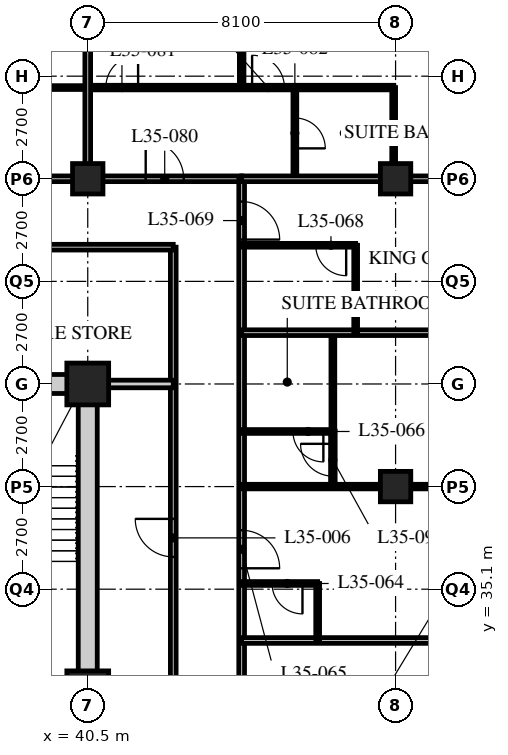
"""IFC4 building model, lengths in metres.
Left out: names, types, materials, properties, quantities, classifications, styles, units other than length and angle.
Written with IfcOpenShell. Run it as: python <this file> out.ifc"""

import sys

from ifc_helpers import new_model, si_unit, direction, frame, frame_2d, origin, origin_2d, place, context, subcontext, project, spatial, rectangle, hollow_rectangle, extrude, element, fill, save


model = new_model("IFC4")
c1 = context("Model", 3, precision=1e-05, world=origin(), true_north=direction((0.0, 1.0)))
c2 = subcontext(c1, "Body", "Model", "MODEL_VIEW")
j1 = project(units=[si_unit("LENGTHUNIT", "METRE"), si_unit("PLANEANGLEUNIT", "RADIAN")], contexts=[c1])
p1 = place(None, origin())
s1 = spatial("IfcSite", under=j1, at=p1, CompositionType="ELEMENT")
p2 = place(p1, origin())
s2 = spatial("IfcBuilding", under=s1, at=p2, CompositionType="ELEMENT")
p3 = place(p2, frame((0.0, 0.0, 137.4)))
s3 = spatial("IfcBuildingStorey", under=s2, at=p3, CompositionType="ELEMENT", Elevation=137.4)
for number, where, z_axis, x_axis in (
    (1, (40.5, 32.4, 0.0), (0.0, 0.0, 1.0), (1.0, 0.0, 0.0)),
    (2, (40.5, 40.5, 0.0), (0.0, 0.0, 1.0), (1.0, 0.0, 0.0)),
):
    element("IfcColumn", number, at=place(p3, frame(where, z_axis=z_axis, x_axis=x_axis)), inside=s3, PredefinedType="COLUMN", context=c2, shape_type="SweptSolid", body=[
        extrude(hollow_rectangle(XDim=1.1, YDim=1.1, WallThickness=0.1, at=origin_2d()), origin(), (0.0, 0.0, 1.0), 3.4),
    ])
for number, where, z_axis, x_axis in (
    (3, (40.5, 45.9, 0.0), (0.0, 0.0, 1.0), (1.0, 0.0, 0.0)),
    (4, (48.6, 37.8, 0.0), (0.0, 0.0, 1.0), (1.0, 0.0, 0.0)),
    (5, (48.6, 45.9, 0.0), (0.0, 0.0, 1.0), (1.0, 0.0, 0.0)),
):
    element("IfcColumn", number, at=place(p3, frame(where, z_axis=z_axis, x_axis=x_axis)), inside=s3, PredefinedType="COLUMN", context=c2, shape_type="SweptSolid", body=[
        extrude(hollow_rectangle(XDim=0.8, YDim=0.8, WallThickness=0.08, at=origin_2d()), origin(), (0.0, 0.0, 1.0), 3.4),
    ])
p4 = place(p3, frame((8.1, 45.9, 0.0), z_axis=(0.0, 0.0, 1.0), x_axis=(1.0, 0.0, 0.0)))
e6 = element("IfcWall", 6, at=p4, inside=s3, PredefinedType="PARTITIONING", context=c2, shape_type="SweptSolid", body=[
    extrude(rectangle(XDim=36.45, YDim=0.15, at=frame_2d((18.225, 0.0))), origin(), (0.0, 0.0, 1.0), 2.578),
])
p5 = place(p4, frame((9.625, 0.0, 0.0)))
e7 = element("IfcOpeningElement", 7, at=p5, cuts=e6, PredefinedType="OPENING", context=c2, shape_type="SweptSolid", body=[
    extrude(rectangle(XDim=1.0, YDim=2.1, at=frame_2d((0.5, 1.05))), frame((0.0, 0.085, 0.0), z_axis=(0.0, -1.0, 0.0), x_axis=(1.0, 0.0, 0.0)), (0.0, 0.0, 1.0), 0.17),
])
p6 = place(p4, frame((21.775, 0.0, 0.0)))
e8 = element("IfcOpeningElement", 8, at=p6, cuts=e6, PredefinedType="OPENING", context=c2, shape_type="SweptSolid", body=[
    extrude(rectangle(XDim=1.0, YDim=2.1, at=frame_2d((0.5, 1.05))), frame((0.0, 0.085, 0.0), z_axis=(0.0, -1.0, 0.0), x_axis=(1.0, 0.0, 0.0)), (0.0, 0.0, 1.0), 0.17),
])
p7 = place(p4, frame((28.95, 0.0, 0.0)))
e9 = element("IfcOpeningElement", 9, at=p7, cuts=e6, PredefinedType="OPENING", context=c2, shape_type="SweptSolid", body=[
    extrude(rectangle(XDim=1.0, YDim=2.1, at=frame_2d((0.5, 1.05))), frame((0.0, 0.085, 0.0), z_axis=(0.0, -1.0, 0.0), x_axis=(1.0, 0.0, 0.0)), (0.0, 0.0, 1.0), 0.17),
])
p8 = place(p4, frame((33.925, 0.0, 0.0)))
e10 = element("IfcOpeningElement", 10, at=p8, cuts=e6, PredefinedType="OPENING", context=c2, shape_type="SweptSolid", body=[
    extrude(rectangle(XDim=1.0, YDim=2.1, at=frame_2d((0.5, 1.05))), frame((0.0, 0.085, 0.0), z_axis=(0.0, -1.0, 0.0), x_axis=(1.0, 0.0, 0.0)), (0.0, 0.0, 1.0), 0.17),
])
p9 = place(p4, frame((2.625, 0.0, 0.0)))
e11 = element("IfcOpeningElement", 11, at=p9, cuts=e6, PredefinedType="OPENING", context=c2, shape_type="SweptSolid", body=[
    extrude(rectangle(XDim=1.0, YDim=2.1, at=frame_2d((0.5, 1.05))), frame((0.0, 0.085, 0.0), z_axis=(0.0, -1.0, 0.0), x_axis=(1.0, 0.0, 0.0)), (0.0, 0.0, 1.0), 0.17),
])
p10 = place(p3, frame((44.55, 17.55, 0.0), z_axis=(0.0, 0.0, 1.0), x_axis=(0.0, 1.0, 0.0)))
e12 = element("IfcWall", 12, at=p10, inside=s3, PredefinedType="PARTITIONING", context=c2, shape_type="SweptSolid", body=[
    extrude(rectangle(XDim=28.35, YDim=0.15, at=frame_2d((14.175, 0.0))), origin(), (0.0, 0.0, 1.0), 3.19),
])
p11 = place(p10, frame((2.75, 0.0, 0.0)))
e13 = element("IfcOpeningElement", 13, at=p11, cuts=e12, PredefinedType="OPENING", context=c2, shape_type="SweptSolid", body=[
    extrude(rectangle(XDim=1.0, YDim=2.1, at=frame_2d((0.5, 1.05))), frame((0.0, 0.085, 0.0), z_axis=(0.0, -1.0, 0.0), x_axis=(1.0, 0.0, 0.0)), (0.0, 0.0, 1.0), 0.17),
])
p12 = place(p10, frame((6.5, 0.0, 0.0)))
e14 = element("IfcOpeningElement", 14, at=p12, cuts=e12, PredefinedType="OPENING", context=c2, shape_type="SweptSolid", body=[
    extrude(rectangle(XDim=1.0, YDim=2.1, at=frame_2d((0.5, 1.05))), frame((0.0, 0.085, 0.0), z_axis=(0.0, -1.0, 0.0), x_axis=(1.0, 0.0, 0.0)), (0.0, 0.0, 1.0), 0.17),
])
p13 = place(p10, frame((13.55, 0.0, 0.0)))
e15 = element("IfcOpeningElement", 15, at=p13, cuts=e12, PredefinedType="OPENING", context=c2, shape_type="SweptSolid", body=[
    extrude(rectangle(XDim=1.0, YDim=2.1, at=frame_2d((0.5, 1.05))), frame((0.0, 0.085, 0.0), z_axis=(0.0, -1.0, 0.0), x_axis=(1.0, 0.0, 0.0)), (0.0, 0.0, 1.0), 0.17),
])
p14 = place(p10, frame((18.1, 0.0, 0.0)))
e16 = element("IfcOpeningElement", 16, at=p14, cuts=e12, PredefinedType="OPENING", context=c2, shape_type="SweptSolid", body=[
    extrude(rectangle(XDim=1.0, YDim=2.1, at=frame_2d((0.5, 1.05))), frame((0.0, 0.085, 0.0), z_axis=(0.0, -1.0, 0.0), x_axis=(1.0, 0.0, 0.0)), (0.0, 0.0, 1.0), 0.17),
])
p15 = place(p10, frame((26.75, 0.0, 0.0)))
e17 = element("IfcOpeningElement", 17, at=p15, cuts=e12, PredefinedType="OPENING", context=c2, shape_type="SweptSolid", body=[
    extrude(rectangle(XDim=1.0, YDim=2.1, at=frame_2d((0.5, 1.05))), frame((0.0, 0.085, 0.0), z_axis=(0.0, -1.0, 0.0), x_axis=(1.0, 0.0, 0.0)), (0.0, 0.0, 1.0), 0.17),
])
p16 = place(p3, frame((42.75, 19.35, 0.0), z_axis=(0.0, 0.0, 1.0), x_axis=(0.0, 1.0, 0.0)))
e18 = element("IfcWall", 18, at=p16, inside=s3, PredefinedType="PARTITIONING", context=c2, shape_type="SweptSolid", body=[
    extrude(rectangle(XDim=24.75, YDim=0.15, at=frame_2d((12.375, 0.0))), origin(), (0.0, 0.0, 1.0), 3.19),
])
p17 = place(p16, frame((8.5, 0.0, 0.0)))
e19 = element("IfcOpeningElement", 19, at=p17, cuts=e18, PredefinedType="OPENING", context=c2, shape_type="SweptSolid", body=[
    extrude(rectangle(XDim=1.0, YDim=2.1, at=frame_2d((0.5, 1.05))), frame((0.0, 0.085, 0.0), z_axis=(0.0, -1.0, 0.0), x_axis=(1.0, 0.0, 0.0)), (0.0, 0.0, 1.0), 0.17),
])
p18 = place(p16, frame((16.6, 0.0, 0.0)))
e20 = element("IfcOpeningElement", 20, at=p18, cuts=e18, PredefinedType="OPENING", context=c2, shape_type="SweptSolid", body=[
    extrude(rectangle(XDim=1.0, YDim=2.1, at=frame_2d((0.5, 1.05))), frame((0.0, 0.085, 0.0), z_axis=(0.0, -1.0, 0.0), x_axis=(1.0, 0.0, 0.0)), (0.0, 0.0, 1.0), 0.17),
])
p19 = place(p3, frame((42.75, 44.1, 0.0), z_axis=(0.0, 0.0, 1.0), x_axis=(-1.0, 0.0, 0.0)))
e21 = element("IfcWall", 21, at=p19, inside=s3, PredefinedType="PARTITIONING", context=c2, shape_type="SweptSolid", body=[
    extrude(rectangle(XDim=13.19, YDim=0.15, at=frame_2d((6.595, 0.0))), origin(), (0.0, 0.0, 1.0), 3.19),
])
p20 = place(p19, frame((10.2, 0.0, 0.0)))
e22 = element("IfcOpeningElement", 22, at=p20, cuts=e21, PredefinedType="OPENING", context=c2, shape_type="SweptSolid", body=[
    extrude(rectangle(XDim=1.0, YDim=2.1, at=frame_2d((0.5, 1.05))), frame((0.0, 0.085, 0.0), z_axis=(0.0, -1.0, 0.0), x_axis=(1.0, 0.0, 0.0)), (0.0, 0.0, 1.0), 0.17),
])
p21 = place(p19, frame((3.6, 0.0, 0.0)))
e23 = element("IfcOpeningElement", 23, at=p21, cuts=e21, PredefinedType="OPENING", context=c2, shape_type="SweptSolid", body=[
    extrude(rectangle(XDim=1.0, YDim=2.1, at=frame_2d((0.5, 1.05))), frame((0.0, 0.085, 0.0), z_axis=(0.0, -1.0, 0.0), x_axis=(1.0, 0.0, 0.0)), (0.0, 0.0, 1.0), 0.17),
])
p22 = place(p3, frame((40.5, 40.5, 0.0), z_axis=(0.0, 0.0, 1.0), x_axis=(1.0, 0.0, 0.0)))
e24 = element("IfcWall", 24, at=p22, inside=s3, PredefinedType="SOLIDWALL", context=c2, shape_type="SweptSolid", body=[
    extrude(rectangle(XDim=2.25, YDim=0.2, at=frame_2d((1.125, 0.0))), origin(), (0.0, 0.0, 1.0), 3.19),
])
p23 = place(p3, frame((38.2, 48.3, 0.0), z_axis=(0.0, 0.0, 1.0), x_axis=(1.0, 0.0, 0.0)))
e25 = element("IfcWall", 25, at=p23, inside=s3, PredefinedType="PARTITIONING", context=c2, shape_type="SweptSolid", body=[
    extrude(rectangle(XDim=2.3, YDim=0.1, at=frame_2d((1.15, 0.0))), origin(), (0.0, 0.0, 1.0), 3.19),
])
p24 = place(p3, frame((44.55, 33.75, 0.0), z_axis=(0.0, 0.0, 1.0), x_axis=(1.0, 0.0, 0.0)))
e26 = element("IfcWall", 26, at=p24, inside=s3, PredefinedType="PARTITIONING", context=c2, shape_type="SweptSolid", body=[
    extrude(rectangle(XDim=11.85, YDim=0.15, at=frame_2d((5.925, 0.0))), origin(), (0.0, 0.0, 1.0), 3.19),
])
p25 = place(p3, frame((46.55, 33.75, 0.0), z_axis=(0.0, 0.0, 1.0), x_axis=(0.0, 1.0, 0.0)))
e27 = element("IfcWall", 27, at=p25, inside=s3, PredefinedType="PARTITIONING", context=c2, shape_type="SweptSolid", body=[
    extrude(rectangle(XDim=1.5, YDim=0.1, at=frame_2d((0.75, 0.0))), origin(), (0.0, 0.0, 1.0), 3.19),
])
p26 = place(p3, frame((44.55, 35.25, 0.0), z_axis=(0.0, 0.0, 1.0), x_axis=(1.0, 0.0, 0.0)))
e28 = element("IfcWall", 28, at=p26, inside=s3, PredefinedType="PARTITIONING", context=c2, shape_type="SweptSolid", body=[
    extrude(rectangle(XDim=2.0, YDim=0.1, at=frame_2d((1.0, 0.0))), origin(), (0.0, 0.0, 1.0), 3.19),
])
p27 = place(p26, frame((0.8, 0.0, 0.0)))
e29 = element("IfcOpeningElement", 29, at=p27, cuts=e28, PredefinedType="OPENING", context=c2, shape_type="SweptSolid", body=[
    extrude(rectangle(XDim=0.8, YDim=2.1, at=frame_2d((0.4, 1.05))), frame((0.0, 0.06, 0.0), z_axis=(0.0, -1.0, 0.0), x_axis=(1.0, 0.0, 0.0)), (0.0, 0.0, 1.0), 0.12),
])
p28 = place(p3, frame((46.95, 39.25, 0.0), z_axis=(0.0, 0.0, 1.0), x_axis=(0.0, 1.0, 0.0)))
e30 = element("IfcWall", 30, at=p28, inside=s3, PredefinedType="PARTITIONING", context=c2, shape_type="SweptSolid", body=[
    extrude(rectangle(XDim=2.6, YDim=0.1, at=frame_2d((1.3, 0.0))), origin(), (0.0, 0.0, 1.0), 3.19),
])
p29 = place(p3, frame((44.55, 39.25, 0.0), z_axis=(0.0, 0.0, 1.0), x_axis=(1.0, 0.0, 0.0)))
e31 = element("IfcWall", 31, at=p29, inside=s3, PredefinedType="PARTITIONING", context=c2, shape_type="SweptSolid", body=[
    extrude(rectangle(XDim=2.4, YDim=0.1, at=frame_2d((1.2, 0.0))), origin(), (0.0, 0.0, 1.0), 3.19),
])
p30 = place(p29, frame((1.35, 0.0, 0.0)))
e32 = element("IfcOpeningElement", 32, at=p30, cuts=e31, PredefinedType="OPENING", context=c2, shape_type="SweptSolid", body=[
    extrude(rectangle(XDim=0.8, YDim=2.1, at=frame_2d((0.4, 1.05))), frame((0.0, 0.06, 0.0), z_axis=(0.0, -1.0, 0.0), x_axis=(1.0, 0.0, 0.0)), (0.0, 0.0, 1.0), 0.12),
])
p31 = place(p3, frame((44.55, 37.8, 0.0), z_axis=(0.0, 0.0, 1.0), x_axis=(1.0, 0.0, 0.0)))
e33 = element("IfcWall", 33, at=p31, inside=s3, PredefinedType="PARTITIONING", context=c2, shape_type="SweptSolid", body=[
    extrude(rectangle(XDim=11.85, YDim=0.12, at=frame_2d((5.925, 0.0))), origin(), (0.0, 0.0, 1.0), 2.578),
])
p32 = place(p31, frame((6.85, 0.0, 0.0)))
e34 = element("IfcOpeningElement", 34, at=p32, cuts=e33, PredefinedType="OPENING", context=c2, shape_type="SweptSolid", body=[
    extrude(rectangle(XDim=0.85, YDim=2.1, at=frame_2d((0.425, 1.05))), frame((0.0, 0.07, 0.0), z_axis=(0.0, -1.0, 0.0), x_axis=(1.0, 0.0, 0.0)), (0.0, 0.0, 1.0), 0.14),
])
p33 = place(p3, frame((44.55, 41.85, 0.0), z_axis=(0.0, 0.0, 1.0), x_axis=(1.0, 0.0, 0.0)))
e35 = element("IfcWall", 35, at=p33, inside=s3, PredefinedType="PARTITIONING", context=c2, shape_type="SweptSolid", body=[
    extrude(rectangle(XDim=11.85, YDim=0.15, at=frame_2d((5.925, 0.0))), origin(), (0.0, 0.0, 1.0), 3.19),
])
p34 = place(p3, frame((47.55, 41.85, 0.0), z_axis=(0.0, 0.0, 1.0), x_axis=(0.0, 1.0, 0.0)))
e36 = element("IfcWall", 36, at=p34, inside=s3, PredefinedType="PARTITIONING", context=c2, shape_type="SweptSolid", body=[
    extrude(rectangle(XDim=2.3, YDim=0.1, at=frame_2d((1.15, 0.0))), origin(), (0.0, 0.0, 1.0), 3.19),
])
p35 = place(p3, frame((44.55, 44.15, 0.0), z_axis=(0.0, 0.0, 1.0), x_axis=(1.0, 0.0, 0.0)))
e37 = element("IfcWall", 37, at=p35, inside=s3, PredefinedType="PARTITIONING", context=c2, shape_type="SweptSolid", body=[
    extrude(rectangle(XDim=3.0, YDim=0.1, at=frame_2d((1.5, 0.0))), origin(), (0.0, 0.0, 1.0), 3.19),
])
p36 = place(p35, frame((1.95, 0.0, 0.0)))
e38 = element("IfcOpeningElement", 38, at=p36, cuts=e37, PredefinedType="OPENING", context=c2, shape_type="SweptSolid", body=[
    extrude(rectangle(XDim=0.8, YDim=2.1, at=frame_2d((0.4, 1.05))), frame((0.0, 0.06, 0.0), z_axis=(0.0, -1.0, 0.0), x_axis=(1.0, 0.0, 0.0)), (0.0, 0.0, 1.0), 0.12),
])
p37 = place(p3, frame((40.5, 48.3, 0.0), z_axis=(0.0, 0.0, 1.0), x_axis=(1.0, 0.0, 0.0)))
e39 = element("IfcWall", 39, at=p37, inside=s3, PredefinedType="PARTITIONING", context=c2, shape_type="SweptSolid", body=[
    extrude(rectangle(XDim=8.05, YDim=0.12, at=frame_2d((4.025, 0.0))), origin(), (0.0, 0.0, 1.0), 3.19),
])
p38 = place(p37, frame((0.475, 0.0, 0.0)))
e40 = element("IfcOpeningElement", 40, at=p38, cuts=e39, PredefinedType="OPENING", context=c2, shape_type="SweptSolid", body=[
    extrude(rectangle(XDim=0.85, YDim=2.1, at=frame_2d((0.425, 1.05))), frame((0.0, 0.07, 0.0), z_axis=(0.0, -1.0, 0.0), x_axis=(1.0, 0.0, 0.0)), (0.0, 0.0, 1.0), 0.14),
])
p39 = place(p37, frame((4.325, 0.0, 0.0)))
e41 = element("IfcOpeningElement", 41, at=p39, cuts=e39, PredefinedType="OPENING", context=c2, shape_type="SweptSolid", body=[
    extrude(rectangle(XDim=0.85, YDim=2.1, at=frame_2d((0.425, 1.05))), frame((0.0, 0.07, 0.0), z_axis=(0.0, -1.0, 0.0), x_axis=(1.0, 0.0, 0.0)), (0.0, 0.0, 1.0), 0.14),
])
p40 = place(p3, frame((45.95, 45.9, 0.0), z_axis=(0.0, 0.0, 1.0), x_axis=(0.0, 1.0, 0.0)))
e42 = element("IfcWall", 42, at=p40, inside=s3, PredefinedType="PARTITIONING", context=c2, shape_type="SweptSolid", body=[
    extrude(rectangle(XDim=2.4, YDim=0.1, at=frame_2d((1.2, 0.0))), origin(), (0.0, 0.0, 1.0), 3.19),
])
p41 = place(p40, frame((0.8, 0.0, 0.0)))
e43 = element("IfcOpeningElement", 43, at=p41, cuts=e42, PredefinedType="OPENING", context=c2, shape_type="SweptSolid", body=[
    extrude(rectangle(XDim=0.8, YDim=2.1, at=frame_2d((0.4, 1.05))), frame((0.0, 0.06, 0.0), z_axis=(0.0, -1.0, 0.0), x_axis=(1.0, 0.0, 0.0)), (0.0, 0.0, 1.0), 0.12),
])
p42 = place(p3, frame((48.55, 45.9, 0.0), z_axis=(0.0, 0.0, 1.0), x_axis=(0.0, 1.0, 0.0)))
e44 = element("IfcWall", 44, at=p42, inside=s3, PredefinedType="PARTITIONING", context=c2, shape_type="SweptSolid", body=[
    extrude(rectangle(XDim=2.4, YDim=0.1, at=frame_2d((1.2, 0.0))), origin(), (0.0, 0.0, 1.0), 2.578),
])
p43 = place(p3, frame((44.55, 48.3, 0.0), z_axis=(0.0, 0.0, 1.0), x_axis=(0.0, 1.0, 0.0)))
e45 = element("IfcWall", 45, at=p43, inside=s3, PredefinedType="PARTITIONING", context=c2, shape_type="SweptSolid", body=[
    extrude(rectangle(XDim=5.4, YDim=0.12, at=frame_2d((2.7, 0.0))), origin(), (0.0, 0.0, 1.0), 3.19),
])
for number, where, z_axis, x_axis in (
    (46, (44.55, 45.9, 0.0), (0.0, 0.0, 1.0), (1.0, 0.0, 0.0)),
    (47, (40.5, 45.9, 0.0), (0.0, 0.0, 1.0), (0.0, 1.0, 0.0)),
):
    element("IfcWall", number, at=place(p3, frame(where, z_axis=z_axis, x_axis=x_axis)), inside=s3, PredefinedType="PARTITIONING", context=c2, shape_type="SweptSolid", body=[
        extrude(rectangle(XDim=7.8, YDim=0.15, at=frame_2d((3.9, 0.0))), origin(), (0.0, 0.0, 1.0), 2.578),
    ])
p44 = place(p3, frame((46.95, 39.26, 0.0), z_axis=(0.0, 0.0, 1.0), x_axis=(0.0, -1.0, 0.0)))
e48 = element("IfcWall", 48, at=p44, inside=s3, PredefinedType="PARTITIONING", context=c2, shape_type="SweptSolid", body=[
    extrude(rectangle(XDim=1.46, YDim=0.12, at=frame_2d((0.73, 0.0))), origin(), (0.0, 0.0, 1.0), 3.19),
])
p45 = place(p44, frame((0.335, 0.0, 0.0)))
e49 = element("IfcOpeningElement", 49, at=p45, cuts=e48, PredefinedType="OPENING", context=c2, shape_type="SweptSolid", body=[
    extrude(rectangle(XDim=0.85, YDim=2.1, at=frame_2d((0.425, 1.05))), frame((0.0, 0.07, 0.0), z_axis=(0.0, -1.0, 0.0), x_axis=(1.0, 0.0, 0.0)), (0.0, 0.0, 1.0), 0.14),
])
p46 = place(p3, frame((15.95, 40.5, 0.0), z_axis=(0.0, 0.0, 1.0), x_axis=(1.0, 0.0, 0.0)))
e50 = element("IfcWall", 50, at=p46, inside=s3, PredefinedType="SOLIDWALL", context=c2, shape_type="SweptSolid", body=[
    extrude(rectangle(XDim=24.8, YDim=0.5, at=frame_2d((12.4, 0.0))), origin(), (0.0, 0.0, 1.0), 2.54),
])
p47 = place(p46, frame((11.5, 0.0, 0.0)))
e51 = element("IfcOpeningElement", 51, at=p47, cuts=e50, PredefinedType="OPENING", context=c2, shape_type="SweptSolid", body=[
    extrude(rectangle(XDim=1.8, YDim=2.4, at=frame_2d((0.9, 1.2))), frame((0.0, 0.26, 0.0), z_axis=(0.0, -1.0, 0.0), x_axis=(1.0, 0.0, 0.0)), (0.0, 0.0, 1.0), 0.52),
])
p48 = place(p3, frame((40.5, 24.55, 0.0), z_axis=(0.0, 0.0, 1.0), x_axis=(0.0, 1.0, 0.0)))
e52 = element("IfcWall", 52, at=p48, inside=s3, PredefinedType="SOLIDWALL", context=c2, shape_type="SweptSolid", body=[
    extrude(rectangle(XDim=15.7, YDim=0.5, at=frame_2d((7.85, 0.0))), origin(), (0.0, 0.0, 1.0), 2.578),
])
p49 = place(p18, origin())
e53 = element("IfcDoor", 53, at=p49, inside=s3, OperationType="SINGLE_SWING_RIGHT", PredefinedType="DOOR", context=c2, shape_type="SweptSolid", body=[
    extrude(rectangle(XDim=1.0, YDim=2.1, at=frame_2d((0.5, 1.05))), frame((0.0, 0.025, 0.0), z_axis=(0.0, -1.0, 0.0), x_axis=(1.0, 0.0, 0.0)), (0.0, 0.0, 1.0), 0.05),
])
fill(e20, e53)
p50 = place(p27, origin())
e54 = element("IfcDoor", 54, at=p50, inside=s3, OperationType="SINGLE_SWING_LEFT", PredefinedType="DOOR", context=c2, shape_type="SweptSolid", body=[
    extrude(rectangle(XDim=0.8, YDim=2.1, at=frame_2d((0.4, 1.05))), frame((0.0, 0.025, 0.0), z_axis=(0.0, -1.0, 0.0), x_axis=(1.0, 0.0, 0.0)), (0.0, 0.0, 1.0), 0.05),
])
fill(e29, e54)
p51 = place(p14, origin())
e55 = element("IfcDoor", 55, at=p51, inside=s3, OperationType="SINGLE_SWING_RIGHT", PredefinedType="DOOR", context=c2, shape_type="SweptSolid", body=[
    extrude(rectangle(XDim=1.0, YDim=2.1, at=frame_2d((0.5, 1.05))), frame((0.0, 0.025, 0.0), z_axis=(0.0, -1.0, 0.0), x_axis=(1.0, 0.0, 0.0)), (0.0, 0.0, 1.0), 0.05),
])
fill(e16, e55)
p52 = place(p30, origin())
e56 = element("IfcDoor", 56, at=p52, inside=s3, OperationType="SINGLE_SWING_LEFT", PredefinedType="DOOR", context=c2, shape_type="SweptSolid", body=[
    extrude(rectangle(XDim=0.8, YDim=2.1, at=frame_2d((0.4, 1.05))), frame((0.0, 0.025, 0.0), z_axis=(0.0, -1.0, 0.0), x_axis=(1.0, 0.0, 0.0)), (0.0, 0.0, 1.0), 0.05),
])
fill(e32, e56)
p53 = place(p36, origin())
e57 = element("IfcDoor", 57, at=p53, inside=s3, OperationType="SINGLE_SWING_LEFT", PredefinedType="DOOR", context=c2, shape_type="SweptSolid", body=[
    extrude(rectangle(XDim=0.8, YDim=2.1, at=frame_2d((0.4, 1.05))), frame((0.0, 0.025, 0.0), z_axis=(0.0, -1.0, 0.0), x_axis=(1.0, 0.0, 0.0)), (0.0, 0.0, 1.0), 0.05),
])
fill(e38, e57)
p54 = place(p15, origin())
e58 = element("IfcDoor", 58, at=p54, inside=s3, OperationType="SINGLE_SWING_RIGHT", PredefinedType="DOOR", context=c2, shape_type="SweptSolid", body=[
    extrude(rectangle(XDim=1.0, YDim=2.1, at=frame_2d((0.5, 1.05))), frame((0.0, 0.025, 0.0), z_axis=(0.0, -1.0, 0.0), x_axis=(1.0, 0.0, 0.0)), (0.0, 0.0, 1.0), 0.05),
])
fill(e17, e58)
p55 = place(p8, origin())
e59 = element("IfcDoor", 59, at=p55, inside=s3, OperationType="SINGLE_SWING_LEFT", PredefinedType="DOOR", context=c2, shape_type="SweptSolid", body=[
    extrude(rectangle(XDim=1.0, YDim=2.1, at=frame_2d((0.5, 1.05))), frame((0.0, 0.025, 0.0), z_axis=(0.0, -1.0, 0.0), x_axis=(1.0, 0.0, 0.0)), (0.0, 0.0, 1.0), 0.05),
])
fill(e10, e59)
p56 = place(p38, origin())
e60 = element("IfcDoor", 60, at=p56, inside=s3, OperationType="SINGLE_SWING_RIGHT", PredefinedType="DOOR", context=c2, shape_type="SweptSolid", body=[
    extrude(rectangle(XDim=0.85, YDim=2.1, at=frame_2d((0.425, 1.05))), frame((0.0, 0.025, 0.0), z_axis=(0.0, -1.0, 0.0), x_axis=(1.0, 0.0, 0.0)), (0.0, 0.0, 1.0), 0.05),
])
fill(e40, e60)
p57 = place(p41, origin())
e61 = element("IfcDoor", 61, at=p57, inside=s3, OperationType="SINGLE_SWING_RIGHT", PredefinedType="DOOR", context=c2, shape_type="SweptSolid", body=[
    extrude(rectangle(XDim=0.8, YDim=2.1, at=frame_2d((0.4, 1.05))), frame((0.0, 0.025, 0.0), z_axis=(0.0, -1.0, 0.0), x_axis=(1.0, 0.0, 0.0)), (0.0, 0.0, 1.0), 0.05),
])
fill(e43, e61)
p58 = place(p39, origin())
e62 = element("IfcDoor", 62, at=p58, inside=s3, OperationType="SINGLE_SWING_LEFT", PredefinedType="DOOR", context=c2, shape_type="SweptSolid", body=[
    extrude(rectangle(XDim=0.85, YDim=2.1, at=frame_2d((0.425, 1.05))), frame((0.0, 0.025, 0.0), z_axis=(0.0, -1.0, 0.0), x_axis=(1.0, 0.0, 0.0)), (0.0, 0.0, 1.0), 0.05),
])
fill(e41, e62)
p59 = place(p45, origin())
e63 = element("IfcDoor", 63, at=p59, inside=s3, OperationType="SINGLE_SWING_RIGHT", PredefinedType="DOOR", context=c2, shape_type="SweptSolid", body=[
    extrude(rectangle(XDim=0.85, YDim=2.1, at=frame_2d((0.425, 1.05))), frame((0.0, 0.025, 0.0), z_axis=(0.0, -1.0, 0.0), x_axis=(1.0, 0.0, 0.0)), (0.0, 0.0, 1.0), 0.05),
])
fill(e49, e63)
save(model, sys.argv[1])
